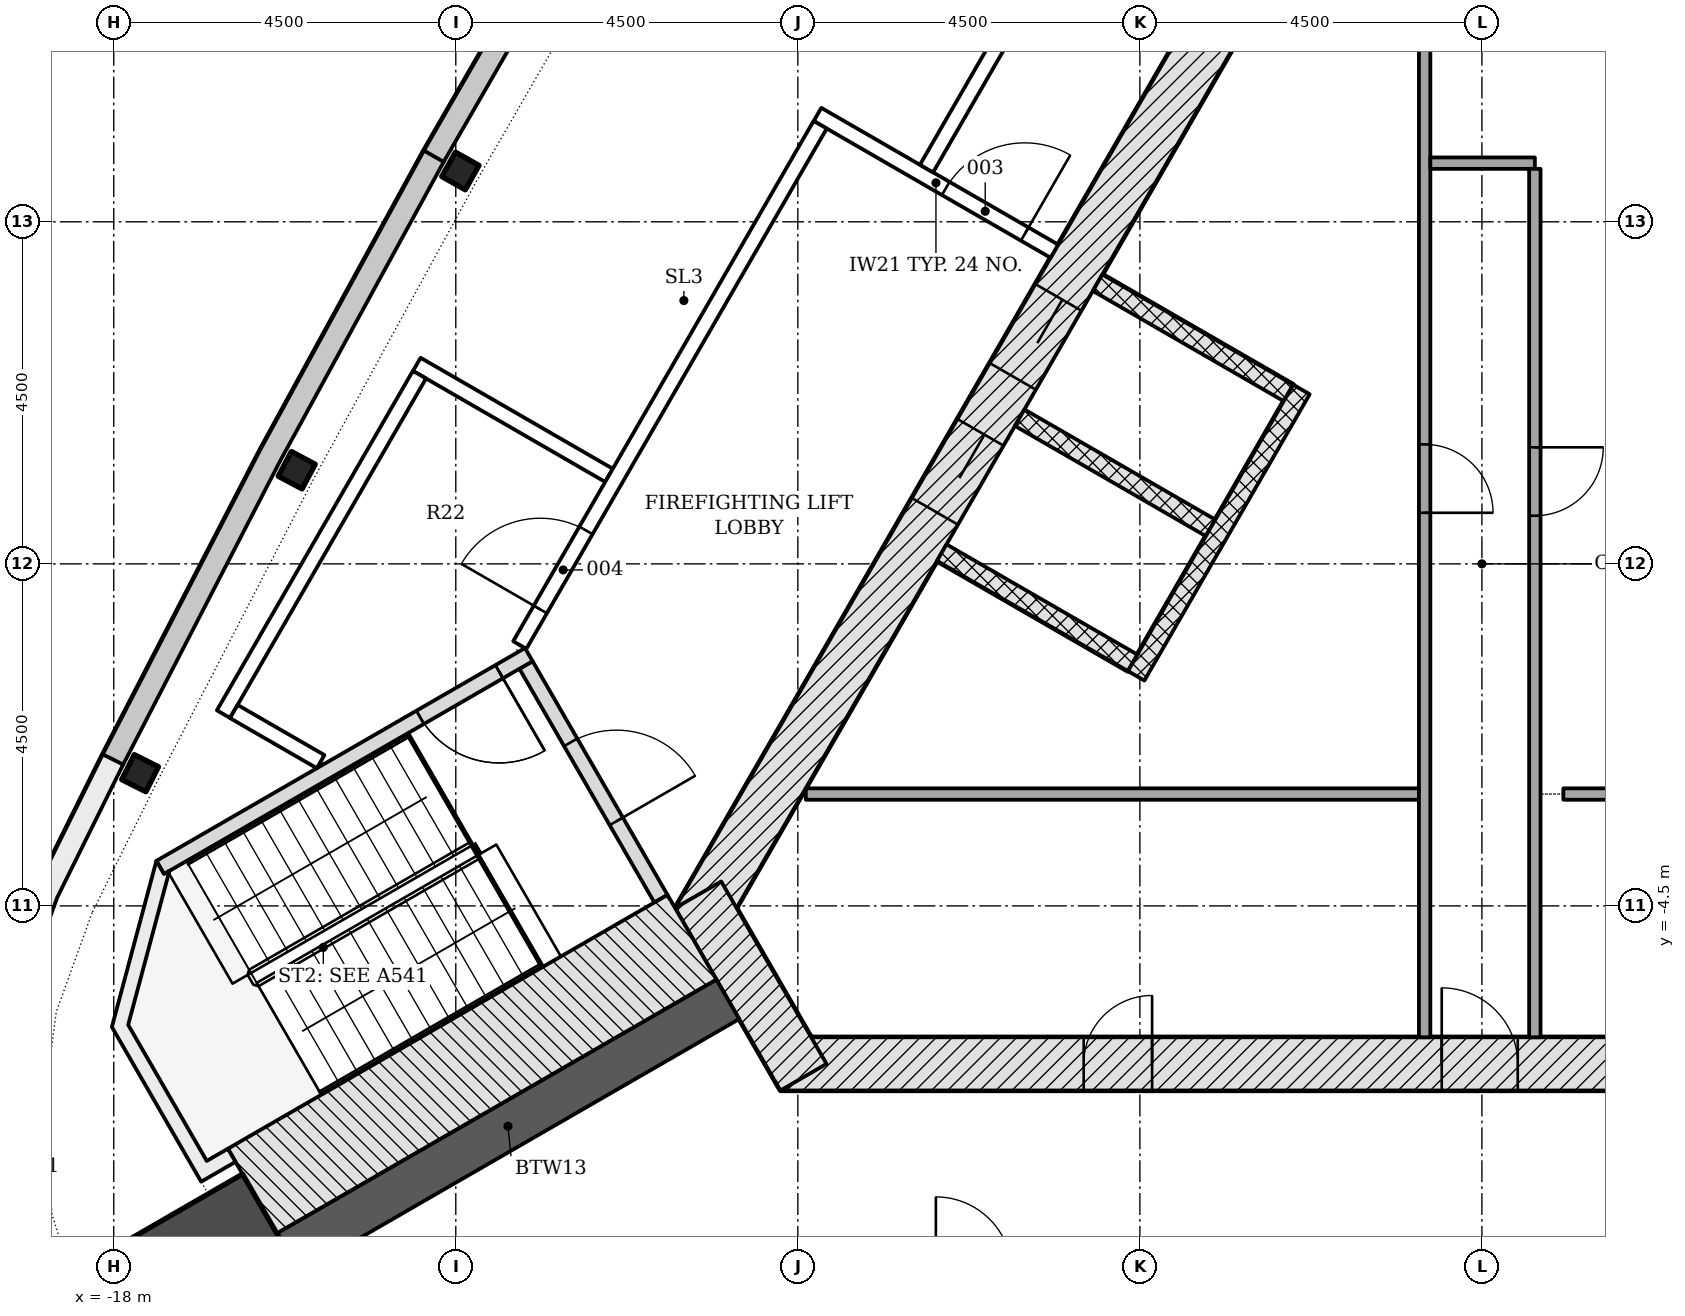
"""IFC4 building model, lengths in metres.
Left out: names, types, materials, properties, quantities, classifications, styles, units other than length and angle.
Written with IfcOpenShell. Run it as: python <this file> out.ifc"""

import sys

from ifc_helpers import new_model, si_unit, direction, frame, frame_2d, origin, origin_2d, place, context, subcontext, project, spatial, polyline, rectangle, i_section, outline, extrude, element, fill, save


model = new_model("IFC4")
c1 = context("Model", 3, precision=1e-05, world=origin(), true_north=direction((0.0, 1.0)))
c2 = subcontext(c1, "Body", "Model", "MODEL_VIEW")
j1 = project(units=[si_unit("LENGTHUNIT", "METRE"), si_unit("PLANEANGLEUNIT", "RADIAN")], contexts=[c1])
p1 = place(None, origin())
s1 = spatial("IfcSite", under=j1, at=p1, CompositionType="ELEMENT")
p2 = place(p1, origin())
s2 = spatial("IfcBuilding", under=s1, at=p2, CompositionType="ELEMENT")
p3 = place(p2, frame((0.0, 0.0, 302.1)))
s3 = spatial("IfcBuildingStorey", under=s2, at=p3, CompositionType="ELEMENT", Elevation=302.1)
p4 = place(p3, frame((-9.229, -6.578, -0.25), z_axis=(0.0, 0.0, 1.0), x_axis=(1.0, 0.0, 0.0)))
e1 = element("IfcWall", 1, at=p4, inside=s3, PredefinedType="SHEAR", context=c2, shape_type="SweptSolid", body=[
    extrude(rectangle(XDim=18.458, YDim=0.7, at=frame_2d((9.229, 0.0))), origin(), (0.0, 0.0, 1.0), 4.5),
])
p5 = place(p4, frame((8.7, 0.0, 0.25)))
e2 = element("IfcOpeningElement", 2, at=p5, cuts=e1, PredefinedType="OPENING", context=c2, shape_type="SweptSolid", body=[
    extrude(rectangle(XDim=1.0, YDim=2.1, at=frame_2d((0.5, 1.05))), frame((0.0, 0.36, 0.0), z_axis=(0.0, -1.0, 0.0), x_axis=(1.0, 0.0, 0.0)), (0.0, 0.0, 1.0), 0.72),
])
p6 = place(p4, frame((3.99, 0.0, 0.25)))
e3 = element("IfcOpeningElement", 3, at=p6, cuts=e1, PredefinedType="OPENING", context=c2, shape_type="SweptSolid", body=[
    extrude(rectangle(XDim=0.9, YDim=2.1, at=frame_2d((0.45, 1.05))), frame((0.0, 0.36, 0.0), z_axis=(0.0, -1.0, 0.0), x_axis=(1.0, 0.0, 0.0)), (0.0, 0.0, 1.0), 0.72),
])
p7 = place(p4, frame((13.539, 0.0, 0.25)))
e4 = element("IfcOpeningElement", 4, at=p7, cuts=e1, PredefinedType="OPENING", context=c2, shape_type="SweptSolid", body=[
    extrude(rectangle(XDim=0.9, YDim=2.1, at=frame_2d((0.45, 1.05))), frame((0.0, 0.36, 0.0), z_axis=(0.0, -1.0, 0.0), x_axis=(1.0, 0.0, 0.0)), (0.0, 0.0, 1.0), 0.72),
])
p8 = place(p3, frame((10.311, -4.703, -0.25), z_axis=(0.0, 0.0, 1.0), x_axis=(-0.500001446645, 0.866024568562, 0.0)))
e5 = element("IfcWall", 5, at=p8, inside=s3, PredefinedType="SHEAR", context=c2, shape_type="SweptSolid", body=[
    extrude(rectangle(XDim=18.458, YDim=0.7, at=frame_2d((9.229, 0.0))), origin(), (0.0, 0.0, 1.0), 4.5),
])
p9 = place(p3, frame((-1.083, 11.281, -0.25), z_axis=(0.0, 0.0, 1.0), x_axis=(-0.500001446645, -0.866024568562, 0.0)))
e6 = element("IfcWall", 6, at=p9, inside=s3, PredefinedType="SHEAR", context=c2, shape_type="SweptSolid", body=[
    extrude(rectangle(XDim=18.458, YDim=0.7, at=frame_2d((9.229, 0.0))), origin(), (0.0, 0.0, 1.0), 4.5),
])
p10 = place(p9, frame((8.979, 0.0, 0.25)))
e7 = element("IfcOpeningElement", 7, at=p10, cuts=e6, PredefinedType="OPENING", context=c2, shape_type="SweptSolid", body=[
    extrude(rectangle(XDim=1.2, YDim=2.1, at=frame_2d((0.6, 1.05))), frame((0.0, 0.36, 0.0), z_axis=(0.0, -1.0, 0.0), x_axis=(1.0, 0.0, 0.0)), (0.0, 0.0, 1.0), 0.72),
])
p11 = place(p9, frame((11.029, 0.0, 0.25)))
e8 = element("IfcOpeningElement", 8, at=p11, cuts=e6, PredefinedType="OPENING", context=c2, shape_type="SweptSolid", body=[
    extrude(rectangle(XDim=1.2, YDim=2.1, at=frame_2d((0.6, 1.05))), frame((0.0, 0.36, 0.0), z_axis=(0.0, -1.0, 0.0), x_axis=(1.0, 0.0, 0.0)), (0.0, 0.0, 1.0), 0.72),
])
p12 = place(p3, frame((-10.311, -4.353, -0.25), z_axis=(0.0, 0.0, 1.0), x_axis=(0.500042739161, -0.866000726912, 0.0)))
e9 = element("IfcWall", 9, at=p12, inside=s3, PredefinedType="SHEAR", context=c2, shape_type="SweptSolid", body=[
    extrude(rectangle(XDim=2.771, YDim=0.7, at=frame_2d((1.386, 0.0))), origin(), (0.0, 0.0, 1.0), 4.5),
])
p13 = place(p3, frame((-9.922, -5.728, -0.25), z_axis=(0.0, 0.0, 1.0), x_axis=(-0.866032176823, -0.499988268569, 0.0)))
e10 = element("IfcWall", 10, at=p13, inside=s3, PredefinedType="SHEAR", context=c2, shape_type="SweptSolid", body=[
    extrude(rectangle(XDim=6.678, YDim=0.6, at=frame_2d((3.339, 0.0))), origin(), (0.0, 0.0, 1.0), 4.5),
])
p14 = place(p3, frame((-16.745, -9.667, -0.25), z_axis=(0.0, 0.0, 1.0), x_axis=(-0.866025403784, -0.5, 0.0)))
e11 = element("IfcColumn", 11, at=p14, inside=s3, PredefinedType="COLUMN", context=c2, shape_type="SweptSolid", body=[
    extrude(rectangle(XDim=2.4, YDim=2.4, at=origin_2d()), origin(), (0.0, 0.0, 1.0), 4.5),
])
for number, where, z_axis, x_axis in (
    (12, (-13.44, 5.169, -0.25), (0.0, 0.0, 1.0), (-0.49, -0.872, 0.0)),
    (13, (-15.593, 1.232, -0.25), (0.0, 0.0, 1.0), (-0.47, -0.883, 0.0)),
    (14, (-17.654, -2.754, -0.25), (0.0, 0.0, 1.0), (-0.449, -0.894, 0.0)),
):
    element("IfcColumn", number, at=place(p3, frame(where, z_axis=z_axis, x_axis=x_axis)), inside=s3, PredefinedType="COLUMN", context=c2, shape_type="SweptSolid", body=[
        extrude(i_section(OverallWidth=0.368, OverallDepth=0.356, WebThickness=0.011, FlangeThickness=0.018, FilletRadius=0.015, at=origin_2d()), origin(), (0.0, 0.0, 1.0), 4.5),
    ])
p15 = place(p3, origin())
e15 = element("IfcWall", 15, at=p15, inside=s3, PredefinedType="NOTDEFINED", context=c2, shape_type="SweptSolid", body=[
    extrude(outline(polyline([(-13.919, 5.438), (-16.078, 1.49), (-18.145, -2.507), (-17.878, -2.645), (-15.813, 1.349), (-13.656, 5.294), (-13.919, 5.438)])), origin(), (0.0, 0.0, 1.0), 4.25),
])
p16 = place(p3, origin())
e16 = element("IfcWall", 16, at=p16, inside=s3, PredefinedType="NOTDEFINED", context=c2, shape_type="SweptSolid", body=[
    extrude(outline(polyline([(-11.669, 9.335), (-13.919, 5.438), (-13.659, 5.288), (-11.409, 9.185), (-11.669, 9.335)])), origin(), (0.0, 0.0, 1.0), 1.2),
])
p17 = place(p3, origin())
e17 = element("IfcWall", 17, at=p17, inside=s3, PredefinedType="NOTDEFINED", context=c2, shape_type="SweptSolid", body=[
    extrude(outline(polyline([(-18.145, -2.507), (-19.021, -4.273), (-19.538, -5.703), (-19.733, -7.21), (-19.599, -8.724), (-19.141, -10.174), (-18.381, -11.49), (-17.355, -12.611), (-16.111, -13.485), (-14.708, -14.069), (-13.211, -14.336), (-11.244, -14.46), (-11.225, -14.161), (-13.176, -14.038), (-14.623, -13.779), (-15.965, -13.22), (-17.156, -12.385), (-18.138, -11.312), (-18.865, -10.052), (-19.303, -8.665), (-19.432, -7.216), (-19.244, -5.774), (-18.745, -4.391), (-17.876, -2.64), (-18.145, -2.507)])), origin(), (0.0, 0.0, 1.0), 4.25),
])
for number, where, z_axis, x_axis in (
    (18, (-5.056, 3.699, -0.25), (0.0, 0.0, 1.0), (0.866, -0.5, 0.0)),
    (19, (-6.081, 1.923, -0.25), (0.0, 0.0, 1.0), (0.866, -0.5, 0.0)),
    (20, (-7.106, 0.148, -0.25), (0.0, 0.0, 1.0), (0.866, -0.5, 0.0)),
):
    element("IfcWall", number, at=place(p3, frame(where, z_axis=z_axis, x_axis=x_axis)), inside=s3, PredefinedType="PARTITIONING", context=c2, shape_type="SweptSolid", body=[
        extrude(rectangle(XDim=2.9, YDim=0.25, at=frame_2d((1.45, 0.0))), origin(), (0.0, 0.0, 1.0), 4.5),
    ])
p18 = place(p3, frame((-2.374, 2.294, 0.0), z_axis=(0.0, 0.0, 1.0), x_axis=(-0.499996127374, -0.866027639635, 0.0)))
e21 = element("IfcWall", 21, at=p18, inside=s3, PredefinedType="PARTITIONING", context=c2, shape_type="SweptSolid", body=[
    extrude(rectangle(XDim=4.35, YDim=0.25, at=frame_2d((2.175, 0.0))), origin(), (0.0, 0.0, 1.0), 4.25),
])
p19 = place(p3, frame((-8.895, -3.028, 0.0), z_axis=(0.0, 0.0, 1.0), x_axis=(1.0, 0.0, 0.0)))
e22 = element("IfcWall", 22, at=p19, inside=s3, PredefinedType="PARTITIONING", context=c2, shape_type="SweptSolid", body=[
    extrude(rectangle(XDim=8.066, YDim=0.15, at=frame_2d((4.033, 0.0))), origin(), (0.0, 0.0, 1.0), 4.25),
])
p20 = place(p3, frame((-0.754, 10.756, 0.0), z_axis=(0.0, 0.0, 1.0), x_axis=(0.0, -1.0, 0.0)))
e23 = element("IfcWall", 23, at=p20, inside=s3, PredefinedType="PARTITIONING", context=c2, shape_type="SweptSolid", body=[
    extrude(rectangle(XDim=16.985, YDim=0.15, at=frame_2d((8.492, 0.0))), origin(), (0.0, 0.0, 1.0), 4.25),
])
p21 = place(p20, frame((9.185, 0.0, 0.0)))
e24 = element("IfcOpeningElement", 24, at=p21, cuts=e23, PredefinedType="OPENING", context=c2, shape_type="SweptSolid", body=[
    extrude(rectangle(XDim=0.9, YDim=2.1, at=frame_2d((0.45, 1.05))), frame((0.0, 0.085, 0.0), z_axis=(0.0, -1.0, 0.0), x_axis=(1.0, 0.0, 0.0)), (0.0, 0.0, 1.0), 0.17),
])
p22 = place(p3, frame((-0.679, 5.272, 0.0), z_axis=(0.0, 0.0, 1.0), x_axis=(1.0, 0.0, 0.0)))
e25 = element("IfcWall", 25, at=p22, inside=s3, PredefinedType="PARTITIONING", context=c2, shape_type="SweptSolid", body=[
    extrude(rectangle(XDim=1.375, YDim=0.15, at=frame_2d((0.688, 0.0))), origin(), (0.0, 0.0, 1.0), 4.25),
])
p23 = place(p3, frame((0.696, 5.197, 0.0), z_axis=(0.0, 0.0, 1.0), x_axis=(0.0, -1.0, 0.0)))
e26 = element("IfcWall", 26, at=p23, inside=s3, PredefinedType="PARTITIONING", context=c2, shape_type="SweptSolid", body=[
    extrude(rectangle(XDim=11.425, YDim=0.15, at=frame_2d((5.712, 0.0))), origin(), (0.0, 0.0, 1.0), 4.25),
])
p24 = place(p23, frame((3.664, 0.0, 0.0)))
e27 = element("IfcOpeningElement", 27, at=p24, cuts=e26, PredefinedType="OPENING", context=c2, shape_type="SweptSolid", body=[
    extrude(rectangle(XDim=0.9, YDim=2.1, at=frame_2d((0.45, 1.05))), frame((0.0, 0.085, 0.0), z_axis=(0.0, -1.0, 0.0), x_axis=(1.0, 0.0, 0.0)), (0.0, 0.0, 1.0), 0.17),
])
p25 = place(p3, frame((1.071, -3.028, 0.0), z_axis=(0.0, 0.0, 1.0), x_axis=(1.0, 0.0, 0.0)))
e28 = element("IfcWall", 28, at=p25, inside=s3, PredefinedType="PARTITIONING", context=c2, shape_type="SweptSolid", body=[
    extrude(rectangle(XDim=7.824, YDim=0.15, at=frame_2d((3.912, 0.0))), origin(), (0.0, 0.0, 1.0), 4.25),
])
p26 = place(p3, frame((-12.576, -1.331, -0.25), z_axis=(0.0, 0.0, 1.0), x_axis=(0.499970499736, -0.8660424351, 0.0)))
e29 = element("IfcWall", 29, at=p26, inside=s3, PredefinedType="SHEAR", context=c2, shape_type="SweptSolid", body=[
    extrude(rectangle(XDim=3.55, YDim=0.2, at=frame_2d((1.775, 0.0))), origin(), (0.0, 0.0, 1.0), 4.5),
])
p27 = place(p26, frame((1.175, 0.0, 0.25)))
e30 = element("IfcOpeningElement", 30, at=p27, cuts=e29, PredefinedType="OPENING", context=c2, shape_type="SweptSolid", body=[
    extrude(rectangle(XDim=1.2, YDim=2.1, at=frame_2d((0.6, 1.05))), frame((0.0, 0.11, 0.0), z_axis=(0.0, -1.0, 0.0), x_axis=(1.0, 0.0, 0.0)), (0.0, 0.0, 1.0), 0.22),
])
p28 = place(p3, frame((-12.539, -1.194, -0.25), z_axis=(0.0, 0.0, 1.0), x_axis=(-0.866045472092, -0.499965239061, 0.0)))
e31 = element("IfcWall", 31, at=p28, inside=s3, PredefinedType="SHEAR", context=c2, shape_type="SweptSolid", body=[
    extrude(rectangle(XDim=5.6, YDim=0.2, at=frame_2d((2.8, 0.0))), origin(), (0.0, 0.0, 1.0), 4.5),
])
p29 = place(p28, frame((0.45, 0.0, 0.25)))
e32 = element("IfcOpeningElement", 32, at=p29, cuts=e31, PredefinedType="OPENING", context=c2, shape_type="SweptSolid", body=[
    extrude(rectangle(XDim=1.2, YDim=2.1, at=frame_2d((0.6, 1.05))), frame((0.0, 0.11, 0.0), z_axis=(0.0, -1.0, 0.0), x_axis=(1.0, 0.0, 0.0)), (0.0, 0.0, 1.0), 0.22),
])
p30 = place(p3, frame((-10.393, -4.912, -0.25), z_axis=(0.0, 0.0, 1.0), x_axis=(-0.866025486527, -0.499999856685, 0.0)))
e33 = element("IfcWall", 33, at=p30, inside=s3, PredefinedType="SHEAR", context=c2, shape_type="SweptSolid", body=[
    extrude(rectangle(XDim=6.679, YDim=1.286, at=frame_2d((3.339, 0.0))), origin(), (0.0, 0.0, 1.0), 4.5),
])
p31 = place(p3, frame((0.0, 0.0, -0.25)))
e34 = element("IfcWall", 34, at=p31, inside=s3, PredefinedType="SHEAR", context=c2, shape_type="SweptSolid", body=[
    extrude(outline(polyline([(-17.439, -3.907), (-18.025, -6.093), (-16.85, -8.128), (-16.398, -7.867), (-16.498, -7.694), (-16.498, -7.694), (-16.777, -7.855), (-17.81, -6.065), (-17.267, -4.039), (-17.339, -4.081), (-17.339, -4.081), (-17.339, -4.081), (-17.339, -4.081), (-17.339, -4.081), (-17.339, -4.081), (-17.339, -4.081), (-17.339, -4.081), (-17.339, -4.081), (-17.339, -4.081), (-17.339, -4.081), (-17.339, -4.081), (-17.339, -4.081), (-17.339, -4.081), (-17.339, -4.081), (-17.339, -4.081), (-17.339, -4.081), (-17.439, -3.907)])), origin(), (0.0, 0.0, 1.0), 4.5),
])
p32 = place(p3, frame((-8.741, 5.913, 0.0), z_axis=(0.0, 0.0, 1.0), x_axis=(0.866017220491, -0.500014173611, 0.0)))
e35 = element("IfcWall", 35, at=p32, inside=s3, PredefinedType="PARTITIONING", context=c2, shape_type="SweptSolid", body=[
    extrude(rectangle(XDim=3.598, YDim=0.2, at=frame_2d((1.799, 0.0))), origin(), (0.0, 0.0, 1.0), 4.25),
])
p33 = place(p32, frame((1.948, 0.0, 0.0)))
e36 = element("IfcOpeningElement", 36, at=p33, cuts=e35, PredefinedType="OPENING", context=c2, shape_type="SweptSolid", body=[
    extrude(rectangle(XDim=1.2, YDim=2.1, at=frame_2d((0.6, 1.05))), frame((0.0, 0.11, 0.0), z_axis=(0.0, -1.0, 0.0), x_axis=(1.0, 0.0, 0.0)), (0.0, 0.0, 1.0), 0.22),
])
p34 = place(p3, frame((-14.013, 2.625, 0.0), z_axis=(0.0, 0.0, 1.0), x_axis=(0.866026830048, -0.499997529631, 0.0)))
e37 = element("IfcWall", 37, at=p34, inside=s3, PredefinedType="PARTITIONING", context=c2, shape_type="SweptSolid", body=[
    extrude(rectangle(XDim=2.919, YDim=0.2, at=frame_2d((1.46, 0.0))), origin(), (0.0, 0.0, 1.0), 4.25),
])
p35 = place(p3, frame((-12.658, -1.068, 0.0), z_axis=(0.0, 0.0, 1.0), x_axis=(0.499996073327, 0.866027670838, 0.0)))
e38 = element("IfcWall", 38, at=p35, inside=s3, PredefinedType="PARTITIONING", context=c2, shape_type="SweptSolid", body=[
    extrude(rectangle(XDim=7.904, YDim=0.2, at=frame_2d((3.952, 0.0))), origin(), (0.0, 0.0, 1.0), 3.702),
])
p36 = place(p35, frame((0.541, 0.0, 0.0)))
e39 = element("IfcOpeningElement", 39, at=p36, cuts=e38, PredefinedType="OPENING", context=c2, shape_type="SweptSolid", body=[
    extrude(rectangle(XDim=1.2, YDim=2.1, at=frame_2d((0.6, 1.05))), frame((0.0, 0.11, 0.0), z_axis=(0.0, -1.0, 0.0), x_axis=(1.0, 0.0, 0.0)), (0.0, 0.0, 1.0), 0.22),
])
p37 = place(p3, frame((-7.307, 5.2, 0.0), z_axis=(0.0, 0.0, 1.0), x_axis=(0.49999780173, 0.866026672953, 0.0)))
e40 = element("IfcWall", 40, at=p37, inside=s3, PredefinedType="PARTITIONING", context=c2, shape_type="SweptSolid", body=[
    extrude(rectangle(XDim=13.841, YDim=0.2, at=frame_2d((6.92, 0.0))), origin(), (0.0, 0.0, 1.0), 3.702),
])
p38 = place(p37, frame((9.457, 0.0, 0.0)))
e41 = element("IfcOpeningElement", 41, at=p38, cuts=e40, PredefinedType="OPENING", context=c2, shape_type="SweptSolid", body=[
    extrude(rectangle(XDim=1.0, YDim=2.1, at=frame_2d((0.5, 1.05))), frame((0.0, 0.11, 0.0), z_axis=(0.0, -1.0, 0.0), x_axis=(1.0, 0.0, 0.0)), (0.0, 0.0, 1.0), 0.22),
])
p39 = place(p37, frame((2.299, 0.0, 0.0)))
e42 = element("IfcOpeningElement", 42, at=p39, cuts=e40, PredefinedType="OPENING", context=c2, shape_type="SweptSolid", body=[
    extrude(rectangle(XDim=1.0, YDim=2.1, at=frame_2d((0.5, 1.05))), frame((0.0, 0.11, 0.0), z_axis=(0.0, -1.0, 0.0), x_axis=(1.0, 0.0, 0.0)), (0.0, 0.0, 1.0), 0.22),
])
p40 = place(p3, frame((-16.556, -1.977, 0.0), z_axis=(0.0, 0.0, 1.0), x_axis=(0.499983365876, 0.866035007288, 0.0)))
e43 = element("IfcWall", 43, at=p40, inside=s3, PredefinedType="PARTITIONING", context=c2, shape_type="SweptSolid", body=[
    extrude(rectangle(XDim=5.157, YDim=0.2, at=frame_2d((2.579, 0.0))), origin(), (0.0, 0.0, 1.0), 3.702),
])
p41 = place(p3, frame((-16.421, -1.942, 0.0), z_axis=(0.0, 0.0, 1.0), x_axis=(0.865991484893, -0.500058744641, 0.0)))
e44 = element("IfcWall", 44, at=p41, inside=s3, PredefinedType="PARTITIONING", context=c2, shape_type="SweptSolid", body=[
    extrude(rectangle(XDim=1.32, YDim=0.2, at=frame_2d((0.66, 0.0))), origin(), (0.0, 0.0, 1.0), 4.25),
])
p42 = place(p10, origin())
e45 = element("IfcDoor", 45, at=p42, inside=s3, OperationType="DOUBLE_DOOR_SLIDING", PredefinedType="DOOR", context=c2, shape_type="SweptSolid", body=[
    extrude(rectangle(XDim=1.2, YDim=2.1, at=frame_2d((0.6, 1.05))), frame((0.0, 0.025, 0.0), z_axis=(0.0, -1.0, 0.0), x_axis=(1.0, 0.0, 0.0)), (0.0, 0.0, 1.0), 0.05),
])
fill(e7, e45)
p43 = place(p11, origin())
e46 = element("IfcDoor", 46, at=p43, inside=s3, OperationType="DOUBLE_DOOR_SLIDING", PredefinedType="DOOR", context=c2, shape_type="SweptSolid", body=[
    extrude(rectangle(XDim=1.2, YDim=2.1, at=frame_2d((0.6, 1.05))), frame((0.0, 0.025, 0.0), z_axis=(0.0, -1.0, 0.0), x_axis=(1.0, 0.0, 0.0)), (0.0, 0.0, 1.0), 0.05),
])
fill(e8, e46)
p44 = place(p5, origin())
e47 = element("IfcDoor", 47, at=p44, inside=s3, OperationType="SINGLE_SWING_LEFT", PredefinedType="DOOR", context=c2, shape_type="SweptSolid", body=[
    extrude(rectangle(XDim=1.0, YDim=2.1, at=frame_2d((0.5, 1.05))), frame((0.0, 0.075, 0.0), z_axis=(0.0, -1.0, 0.0), x_axis=(1.0, 0.0, 0.0)), (0.0, 0.0, 1.0), 0.15),
])
fill(e2, e47)
p45 = place(p6, origin())
e48 = element("IfcDoor", 48, at=p45, inside=s3, OperationType="SINGLE_SWING_RIGHT", PredefinedType="DOOR", context=c2, shape_type="SweptSolid", body=[
    extrude(rectangle(XDim=0.9, YDim=2.1, at=frame_2d((0.45, 1.05))), frame((0.0, 0.075, 0.0), z_axis=(0.0, -1.0, 0.0), x_axis=(1.0, 0.0, 0.0)), (0.0, 0.0, 1.0), 0.15),
])
fill(e3, e48)
p46 = place(p21, origin())
e49 = element("IfcDoor", 49, at=p46, inside=s3, OperationType="SINGLE_SWING_RIGHT", PredefinedType="DOOR", context=c2, shape_type="SweptSolid", body=[
    extrude(rectangle(XDim=0.9, YDim=2.1, at=frame_2d((0.45, 1.05))), frame((0.0, 0.025, 0.0), z_axis=(0.0, -1.0, 0.0), x_axis=(1.0, 0.0, 0.0)), (0.0, 0.0, 1.0), 0.05),
])
fill(e24, e49)
p47 = place(p24, origin())
e50 = element("IfcDoor", 50, at=p47, inside=s3, OperationType="SINGLE_SWING_LEFT", PredefinedType="DOOR", context=c2, shape_type="SweptSolid", body=[
    extrude(rectangle(XDim=0.9, YDim=2.1, at=frame_2d((0.45, 1.05))), frame((0.0, 0.025, 0.0), z_axis=(0.0, -1.0, 0.0), x_axis=(1.0, 0.0, 0.0)), (0.0, 0.0, 1.0), 0.05),
])
fill(e27, e50)
p48 = place(p27, origin())
e51 = element("IfcDoor", 51, at=p48, inside=s3, OperationType="SINGLE_SWING_RIGHT", PredefinedType="DOOR", context=c2, shape_type="SweptSolid", body=[
    extrude(rectangle(XDim=1.2, YDim=2.1, at=frame_2d((0.6, 1.05))), frame((0.0, 0.025, 0.0), z_axis=(0.0, -1.0, 0.0), x_axis=(1.0, 0.0, 0.0)), (0.0, 0.0, 1.0), 0.05),
])
fill(e30, e51)
p49 = place(p29, origin())
e52 = element("IfcDoor", 52, at=p49, inside=s3, OperationType="SINGLE_SWING_LEFT", PredefinedType="DOOR", context=c2, shape_type="SweptSolid", body=[
    extrude(rectangle(XDim=1.2, YDim=2.1, at=frame_2d((0.6, 1.05))), frame((0.0, 0.025, 0.0), z_axis=(0.0, -1.0, 0.0), x_axis=(1.0, 0.0, 0.0)), (0.0, 0.0, 1.0), 0.05),
])
fill(e32, e52)
p50 = place(p2, frame((0.0, 0.0, 306.6)))
p51 = place(p50, frame((-12.539, -1.194, -0.25), z_axis=(0.0, 0.0, 1.0), x_axis=(-0.866045472092, -0.499965239061, 0.0)))
p52 = place(p51, frame((0.45, 0.0, 0.25)))
p53 = place(p52, origin())
e53 = element("IfcDoor", 53, at=p53, inside=s3, OperationType="SINGLE_SWING_LEFT", PredefinedType="DOOR", context=c2, shape_type="SweptSolid", body=[
    extrude(rectangle(XDim=1.2, YDim=2.1, at=frame_2d((0.6, 1.05))), frame((0.0, 0.025, 0.0), z_axis=(0.0, -1.0, 0.0), x_axis=(1.0, 0.0, 0.0)), (0.0, 0.0, 1.0), 0.05),
])
p54 = place(p33, origin())
e54 = element("IfcDoor", 54, at=p54, inside=s3, OperationType="SINGLE_SWING_RIGHT", PredefinedType="DOOR", context=c2, shape_type="SweptSolid", body=[
    extrude(rectangle(XDim=1.2, YDim=2.1, at=frame_2d((0.6, 1.05))), frame((0.0, 0.025, 0.0), z_axis=(0.0, -1.0, 0.0), x_axis=(1.0, 0.0, 0.0)), (0.0, 0.0, 1.0), 0.05),
])
fill(e36, e54)
p55 = place(p36, origin())
e55 = element("IfcDoor", 55, at=p55, inside=s3, OperationType="SINGLE_SWING_LEFT", PredefinedType="DOOR", context=c2, shape_type="SweptSolid", body=[
    extrude(rectangle(XDim=1.2, YDim=2.1, at=frame_2d((0.6, 1.05))), frame((0.0, 0.025, 0.0), z_axis=(0.0, -1.0, 0.0), x_axis=(1.0, 0.0, 0.0)), (0.0, 0.0, 1.0), 0.05),
])
fill(e39, e55)
save(model, sys.argv[1])
